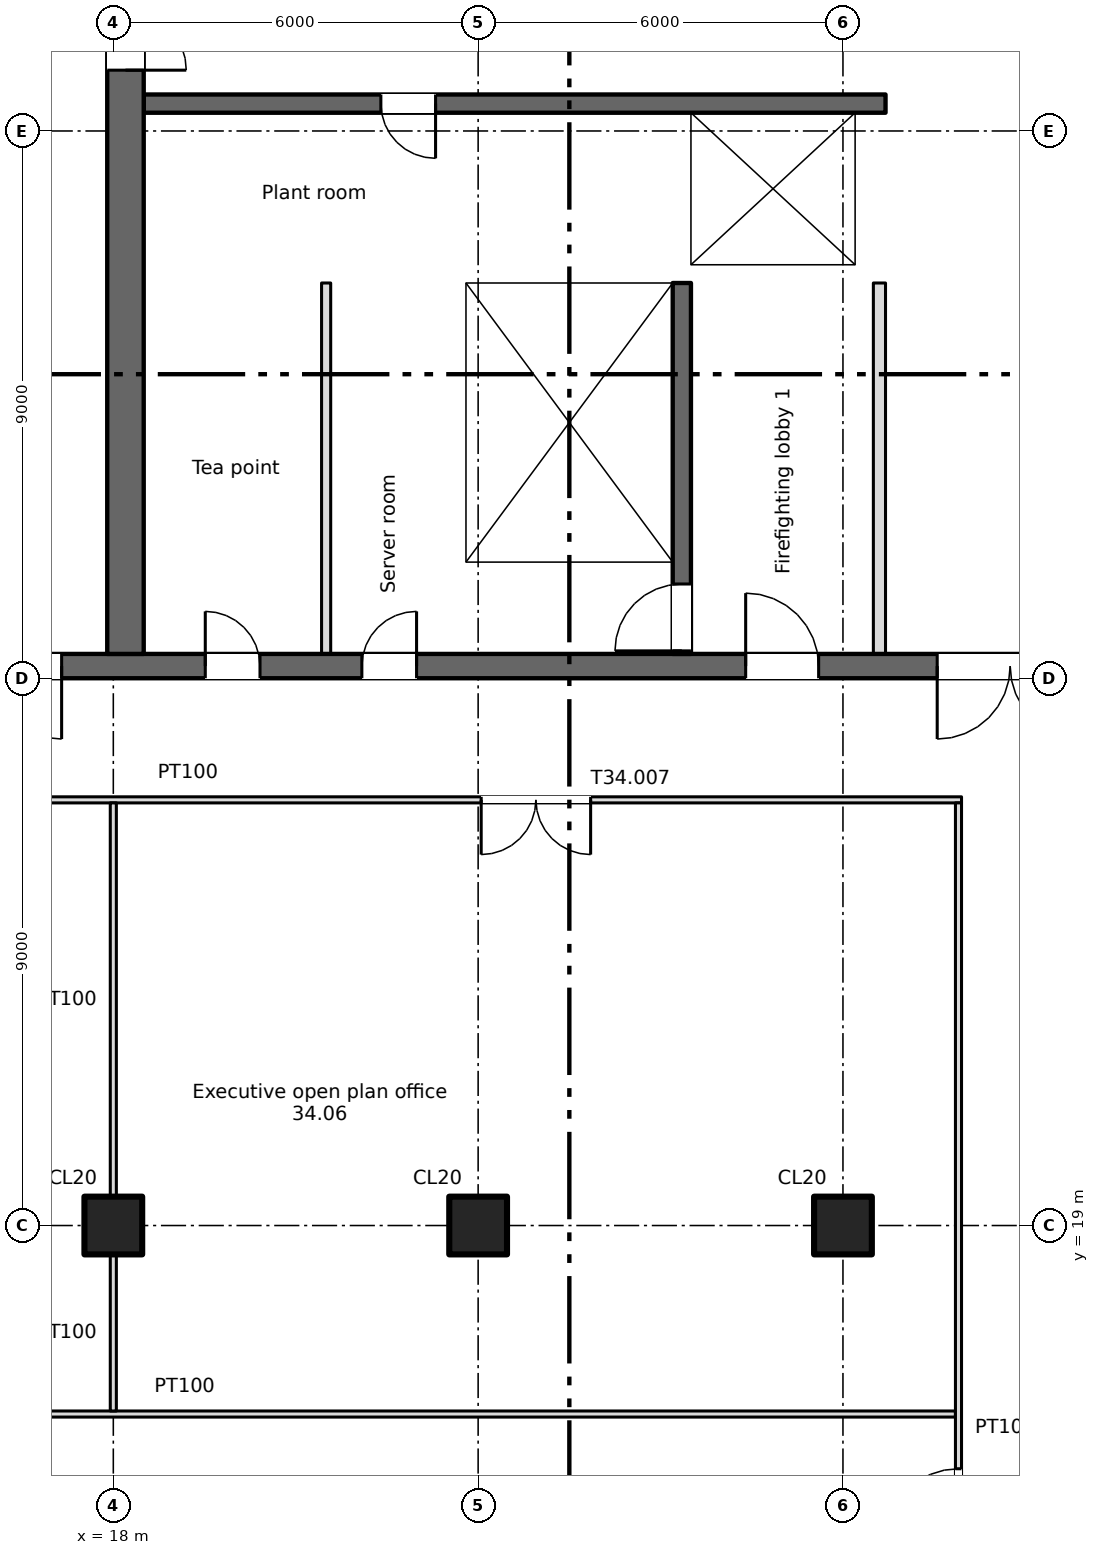
"""IFC4 building model, lengths in metres.
Left out: names, types, materials, properties, quantities, classifications, styles, units other than length and angle.
Written with IfcOpenShell. Run it as: python <this file> out.ifc"""

import sys

from ifc_helpers import new_model, si_unit, direction, frame, frame_2d, origin, origin_2d, place, context, subcontext, project, spatial, rectangle, extrude, element, fill, save


model = new_model("IFC4")
c1 = context("Model", 3, precision=1e-05, world=origin(), true_north=direction((0.0, 1.0)))
c2 = subcontext(c1, "Body", "Model", "MODEL_VIEW")
j1 = project(units=[si_unit("LENGTHUNIT", "METRE"), si_unit("PLANEANGLEUNIT", "RADIAN")], contexts=[c1])
p1 = place(None, origin())
s1 = spatial("IfcSite", under=j1, at=p1, CompositionType="ELEMENT")
p2 = place(p1, origin())
s2 = spatial("IfcBuilding", under=s1, at=p2, CompositionType="ELEMENT")
p3 = place(p2, frame((0.0, 0.0, 235.55)))
s3 = spatial("IfcBuildingStorey", under=s2, at=p3, CompositionType="ELEMENT", Elevation=235.55)
for number, where, z_axis, x_axis in (
    (1, (18.0, 19.0, 0.0), (0.0, 0.0, 1.0), (1.0, 0.0, 0.0)),
    (2, (24.0, 19.0, 0.0), (0.0, 0.0, 1.0), (1.0, 0.0, 0.0)),
    (3, (30.0, 19.0, 0.0), (0.0, 0.0, 1.0), (1.0, 0.0, 0.0)),
):
    element("IfcColumn", number, at=place(p3, frame(where, z_axis=z_axis, x_axis=x_axis)), inside=s3, PredefinedType="COLUMN", context=c2, shape_type="SweptSolid", body=[
        extrude(rectangle(XDim=0.95, YDim=0.95, at=origin_2d()), origin(), (0.0, 0.0, 1.0), 3.4),
    ])
p4 = place(p3, frame((6.5, 28.2, 0.0), z_axis=(0.0, 0.0, 1.0), x_axis=(1.0, 0.0, 0.0)))
e4 = element("IfcWall", 4, at=p4, inside=s3, PredefinedType="SHEAR", context=c2, shape_type="SweptSolid", body=[
    extrude(rectangle(XDim=58.0, YDim=0.4, at=frame_2d((29.0, 0.0))), origin(), (0.0, 0.0, 1.0), 3.4),
])
p5 = place(p4, frame((13.012, 0.0, 0.0)))
e5 = element("IfcOpeningElement", 5, at=p5, cuts=e4, PredefinedType="OPENING", context=c2, shape_type="SweptSolid", body=[
    extrude(rectangle(XDim=0.9, YDim=2.1, at=frame_2d((0.45, 1.05))), frame((0.0, 0.21, 0.0), z_axis=(0.0, -1.0, 0.0), x_axis=(1.0, 0.0, 0.0)), (0.0, 0.0, 1.0), 0.42),
])
p6 = place(p4, frame((15.587, 0.0, 0.0)))
e6 = element("IfcOpeningElement", 6, at=p6, cuts=e4, PredefinedType="OPENING", context=c2, shape_type="SweptSolid", body=[
    extrude(rectangle(XDim=0.9, YDim=2.1, at=frame_2d((0.45, 1.05))), frame((0.0, 0.21, 0.0), z_axis=(0.0, -1.0, 0.0), x_axis=(1.0, 0.0, 0.0)), (0.0, 0.0, 1.0), 0.42),
])
p7 = place(p4, frame((48.512, 0.0, 0.0)))
e7 = element("IfcOpeningElement", 7, at=p7, cuts=e4, PredefinedType="OPENING", context=c2, shape_type="SweptSolid", body=[
    extrude(rectangle(XDim=0.9, YDim=2.1, at=frame_2d((0.45, 1.05))), frame((0.0, 0.21, 0.0), z_axis=(0.0, -1.0, 0.0), x_axis=(1.0, 0.0, 0.0)), (0.0, 0.0, 1.0), 0.42),
])
p8 = place(p4, frame((51.087, 0.0, 0.0)))
e8 = element("IfcOpeningElement", 8, at=p8, cuts=e4, PredefinedType="OPENING", context=c2, shape_type="SweptSolid", body=[
    extrude(rectangle(XDim=0.9, YDim=2.1, at=frame_2d((0.45, 1.05))), frame((0.0, 0.21, 0.0), z_axis=(0.0, -1.0, 0.0), x_axis=(1.0, 0.0, 0.0)), (0.0, 0.0, 1.0), 0.42),
])
p9 = place(p4, frame((0.762, 0.0, 0.0)))
e9 = element("IfcOpeningElement", 9, at=p9, cuts=e4, PredefinedType="OPENING", context=c2, shape_type="SweptSolid", body=[
    extrude(rectangle(XDim=0.9, YDim=2.1, at=frame_2d((0.45, 1.05))), frame((0.0, 0.21, 0.0), z_axis=(0.0, -1.0, 0.0), x_axis=(1.0, 0.0, 0.0)), (0.0, 0.0, 1.0), 0.42),
])
p10 = place(p4, frame((2.337, 0.0, 0.0)))
e10 = element("IfcOpeningElement", 10, at=p10, cuts=e4, PredefinedType="OPENING", context=c2, shape_type="SweptSolid", body=[
    extrude(rectangle(XDim=0.9, YDim=2.1, at=frame_2d((0.45, 1.05))), frame((0.0, 0.21, 0.0), z_axis=(0.0, -1.0, 0.0), x_axis=(1.0, 0.0, 0.0)), (0.0, 0.0, 1.0), 0.42),
])
p11 = place(p4, frame((4.9, 0.0, 0.0)))
e11 = element("IfcOpeningElement", 11, at=p11, cuts=e4, PredefinedType="OPENING", context=c2, shape_type="SweptSolid", body=[
    extrude(rectangle(XDim=1.2, YDim=2.1, at=frame_2d((0.6, 1.05))), frame((0.0, 0.21, 0.0), z_axis=(0.0, -1.0, 0.0), x_axis=(1.0, 0.0, 0.0)), (0.0, 0.0, 1.0), 0.42),
])
p12 = place(p4, frame((31.9, 0.0, 0.0)))
e12 = element("IfcOpeningElement", 12, at=p12, cuts=e4, PredefinedType="OPENING", context=c2, shape_type="SweptSolid", body=[
    extrude(rectangle(XDim=1.2, YDim=2.1, at=frame_2d((0.6, 1.05))), frame((0.0, 0.21, 0.0), z_axis=(0.0, -1.0, 0.0), x_axis=(1.0, 0.0, 0.0)), (0.0, 0.0, 1.0), 0.42),
])
p13 = place(p4, frame((55.4, 0.0, 0.0)))
e13 = element("IfcOpeningElement", 13, at=p13, cuts=e4, PredefinedType="OPENING", context=c2, shape_type="SweptSolid", body=[
    extrude(rectangle(XDim=1.2, YDim=2.1, at=frame_2d((0.6, 1.05))), frame((0.0, 0.21, 0.0), z_axis=(0.0, -1.0, 0.0), x_axis=(1.0, 0.0, 0.0)), (0.0, 0.0, 1.0), 0.42),
])
p14 = place(p4, frame((21.9, 0.0, 0.0)))
e14 = element("IfcOpeningElement", 14, at=p14, cuts=e4, PredefinedType="OPENING", context=c2, shape_type="SweptSolid", body=[
    extrude(rectangle(XDim=1.2, YDim=2.1, at=frame_2d((0.6, 1.05))), frame((0.0, 0.21, 0.0), z_axis=(0.0, -1.0, 0.0), x_axis=(1.0, 0.0, 0.0)), (0.0, 0.0, 1.0), 0.42),
])
p15 = place(p4, frame((41.9, 0.0, 0.0)))
e15 = element("IfcOpeningElement", 15, at=p15, cuts=e4, PredefinedType="OPENING", context=c2, shape_type="SweptSolid", body=[
    extrude(rectangle(XDim=1.2, YDim=2.1, at=frame_2d((0.6, 1.05))), frame((0.0, 0.21, 0.0), z_axis=(0.0, -1.0, 0.0), x_axis=(1.0, 0.0, 0.0)), (0.0, 0.0, 1.0), 0.42),
])
p16 = place(p4, frame((25.05, 0.0, 0.0)))
e16 = element("IfcOpeningElement", 16, at=p16, cuts=e4, PredefinedType="OPENING", context=c2, shape_type="SweptSolid", body=[
    extrude(rectangle(XDim=2.4, YDim=2.1, at=frame_2d((1.2, 1.05))), frame((0.0, 0.21, 0.0), z_axis=(0.0, -1.0, 0.0), x_axis=(1.0, 0.0, 0.0)), (0.0, 0.0, 1.0), 0.42),
])
p17 = place(p4, frame((37.55, 0.0, 0.0)))
e17 = element("IfcOpeningElement", 17, at=p17, cuts=e4, PredefinedType="OPENING", context=c2, shape_type="SweptSolid", body=[
    extrude(rectangle(XDim=2.4, YDim=2.1, at=frame_2d((1.2, 1.05))), frame((0.0, 0.21, 0.0), z_axis=(0.0, -1.0, 0.0), x_axis=(1.0, 0.0, 0.0)), (0.0, 0.0, 1.0), 0.42),
])
p18 = place(p4, frame((8.25, 0.0, 0.0)))
e18 = element("IfcOpeningElement", 18, at=p18, cuts=e4, PredefinedType="OPENING", context=c2, shape_type="SweptSolid", body=[
    extrude(rectangle(XDim=2.4, YDim=2.1, at=frame_2d((1.2, 1.05))), frame((0.0, 0.21, 0.0), z_axis=(0.0, -1.0, 0.0), x_axis=(1.0, 0.0, 0.0)), (0.0, 0.0, 1.0), 0.42),
])
p19 = place(p4, frame((29.05, 0.0, 0.0)))
e19 = element("IfcOpeningElement", 19, at=p19, cuts=e4, PredefinedType="OPENING", context=c2, shape_type="SweptSolid", body=[
    extrude(rectangle(XDim=0.9, YDim=2.1, at=frame_2d((0.45, 1.05))), frame((0.0, 0.21, 0.0), z_axis=(0.0, -1.0, 0.0), x_axis=(1.0, 0.0, 0.0)), (0.0, 0.0, 1.0), 0.42),
])
p20 = place(p4, frame((35.05, 0.0, 0.0)))
e20 = element("IfcOpeningElement", 20, at=p20, cuts=e4, PredefinedType="OPENING", context=c2, shape_type="SweptSolid", body=[
    extrude(rectangle(XDim=0.9, YDim=2.1, at=frame_2d((0.45, 1.05))), frame((0.0, 0.21, 0.0), z_axis=(0.0, -1.0, 0.0), x_axis=(1.0, 0.0, 0.0)), (0.0, 0.0, 1.0), 0.42),
])
p21 = place(p3, frame((18.2, 28.4, 0.0), z_axis=(0.0, 0.0, 1.0), x_axis=(0.0, 1.0, 0.0)))
e21 = element("IfcWall", 21, at=p21, inside=s3, PredefinedType="SHEAR", context=c2, shape_type="SweptSolid", body=[
    extrude(rectangle(XDim=17.0, YDim=0.6, at=frame_2d((8.5, 0.0))), origin(), (0.0, 0.0, 1.0), 3.4),
])
p22 = place(p21, frame((9.6, 0.0, 0.0)))
e22 = element("IfcOpeningElement", 22, at=p22, cuts=e21, PredefinedType="OPENING", context=c2, shape_type="SweptSolid", body=[
    extrude(rectangle(XDim=2.0, YDim=2.1, at=frame_2d((1.0, 1.05))), frame((0.0, 0.31, 0.0), z_axis=(0.0, -1.0, 0.0), x_axis=(1.0, 0.0, 0.0)), (0.0, 0.0, 1.0), 0.62),
])
p23 = place(p21, frame((15.45, 0.0, 0.0)))
e23 = element("IfcOpeningElement", 23, at=p23, cuts=e21, PredefinedType="OPENING", context=c2, shape_type="SweptSolid", body=[
    extrude(rectangle(XDim=1.2, YDim=2.1, at=frame_2d((0.6, 1.05))), frame((0.0, 0.31, 0.0), z_axis=(0.0, -1.0, 0.0), x_axis=(1.0, 0.0, 0.0)), (0.0, 0.0, 1.0), 0.62),
])
p24 = place(p3, frame((23.65, 28.4, 0.0), z_axis=(0.0, 0.0, 1.0), x_axis=(0.0, 1.0, 0.0)))
e24 = element("IfcWall", 24, at=p24, inside=s3, PredefinedType="SHEAR", context=c2, shape_type="SweptSolid", body=[
    extrude(rectangle(XDim=6.1, YDim=0.3, at=frame_2d((3.05, 0.0))), origin(), (0.0, 0.0, 1.0), 3.4),
])
p25 = place(p3, frame((27.35, 28.4, 0.0), z_axis=(0.0, 0.0, 1.0), x_axis=(0.0, 1.0, 0.0)))
e25 = element("IfcWall", 25, at=p25, inside=s3, PredefinedType="SHEAR", context=c2, shape_type="SweptSolid", body=[
    extrude(rectangle(XDim=6.1, YDim=0.3, at=frame_2d((3.05, 0.0))), origin(), (0.0, 0.0, 1.0), 3.4),
])
p26 = place(p25, frame((0.05, 0.0, 0.0)))
e26 = element("IfcOpeningElement", 26, at=p26, cuts=e25, PredefinedType="OPENING", context=c2, shape_type="SweptSolid", body=[
    extrude(rectangle(XDim=1.1, YDim=2.1, at=frame_2d((0.55, 1.05))), frame((0.0, 0.16, 0.0), z_axis=(0.0, -1.0, 0.0), x_axis=(1.0, 0.0, 0.0)), (0.0, 0.0, 1.0), 0.32),
])
p27 = place(p3, frame((18.5, 34.65, 0.0), z_axis=(0.0, 0.0, 1.0), x_axis=(1.0, 0.0, 0.0)))
e27 = element("IfcWall", 27, at=p27, inside=s3, PredefinedType="SHEAR", context=c2, shape_type="SweptSolid", body=[
    extrude(rectangle(XDim=12.2, YDim=0.3, at=frame_2d((6.1, 0.0))), origin(), (0.0, 0.0, 1.0), 3.4),
])
p28 = place(p27, frame((9.8, 0.0, 0.0)))
e28 = element("IfcOpeningElement", 28, at=p28, cuts=e27, PredefinedType="OPENING", context=c2, shape_type="SweptSolid", body=[
    extrude(rectangle(XDim=1.1, YDim=2.1, at=frame_2d((0.55, 1.05))), frame((0.0, 0.16, 0.0), z_axis=(0.0, -1.0, 0.0), x_axis=(1.0, 0.0, 0.0)), (0.0, 0.0, 1.0), 0.32),
])
p29 = place(p3, frame((30.7, 37.45, 0.0), z_axis=(0.0, 0.0, 1.0), x_axis=(-1.0, 0.0, 0.0)))
e29 = element("IfcWall", 29, at=p29, inside=s3, PredefinedType="SHEAR", context=c2, shape_type="SweptSolid", body=[
    extrude(rectangle(XDim=12.2, YDim=0.3, at=frame_2d((6.1, 0.0))), origin(), (0.0, 0.0, 1.0), 3.4),
])
p30 = place(p29, frame((7.4, 0.0, 0.0)))
e30 = element("IfcOpeningElement", 30, at=p30, cuts=e29, PredefinedType="OPENING", context=c2, shape_type="SweptSolid", body=[
    extrude(rectangle(XDim=0.9, YDim=2.1, at=frame_2d((0.45, 1.05))), frame((0.0, 0.16, 0.0), z_axis=(0.0, -1.0, 0.0), x_axis=(1.0, 0.0, 0.0)), (0.0, 0.0, 1.0), 0.32),
])
p31 = place(p3, frame((27.35, 34.8, 0.0), z_axis=(0.0, 0.0, 1.0), x_axis=(0.0, 1.0, 0.0)))
e31 = element("IfcWall", 31, at=p31, inside=s3, PredefinedType="SHEAR", context=c2, shape_type="SweptSolid", body=[
    extrude(rectangle(XDim=2.5, YDim=0.3, at=frame_2d((1.25, 0.0))), origin(), (0.0, 0.0, 1.0), 3.4),
])
p32 = place(p3, frame((30.45, 34.8, 0.0), z_axis=(0.0, 0.0, 1.0), x_axis=(0.0, 1.0, 0.0)))
e32 = element("IfcWall", 32, at=p32, inside=s3, PredefinedType="SHEAR", context=c2, shape_type="SweptSolid", body=[
    extrude(rectangle(XDim=2.5, YDim=0.5, at=frame_2d((1.25, 0.0))), origin(), (0.0, 0.0, 1.0), 3.4),
])
p33 = place(p3, frame((30.6, 28.4, 0.0), z_axis=(0.0, 0.0, 1.0), x_axis=(0.0, 1.0, 0.0)))
e33 = element("IfcWall", 33, at=p33, inside=s3, PredefinedType="PARTITIONING", context=c2, shape_type="SweptSolid", body=[
    extrude(rectangle(XDim=6.1, YDim=0.2, at=frame_2d((3.05, 0.0))), origin(), (0.0, 0.0, 1.0), 3.4),
])
p34 = place(p3, frame((21.5, 28.4, 0.0), z_axis=(0.0, 0.0, 1.0), x_axis=(0.0, 1.0, 0.0)))
e34 = element("IfcWall", 34, at=p34, inside=s3, PredefinedType="PARTITIONING", context=c2, shape_type="SweptSolid", body=[
    extrude(rectangle(XDim=6.1, YDim=0.15, at=frame_2d((3.05, 0.0))), origin(), (0.0, 0.0, 1.0), 3.4),
])
p35 = place(p3, frame((6.5, 15.9, 0.0), z_axis=(0.0, 0.0, 1.0), x_axis=(1.0, 0.0, 0.0)))
e35 = element("IfcWall", 35, at=p35, inside=s3, PredefinedType="PARTITIONING", context=c2, shape_type="SweptSolid", body=[
    extrude(rectangle(XDim=25.35, YDim=0.1, at=frame_2d((12.675, 0.0))), origin(), (0.0, 0.0, 1.0), 3.4),
])
p36 = place(p3, frame((6.5, 26.0, 0.0), z_axis=(0.0, 0.0, 1.0), x_axis=(1.0, 0.0, 0.0)))
e36 = element("IfcWall", 36, at=p36, inside=s3, PredefinedType="PARTITIONING", context=c2, shape_type="SweptSolid", body=[
    extrude(rectangle(XDim=25.45, YDim=0.1, at=frame_2d((12.725, 0.0))), origin(), (0.0, 0.0, 1.0), 3.4),
])
p37 = place(p36, frame((17.55, 0.0, 0.0)))
e37 = element("IfcOpeningElement", 37, at=p37, cuts=e36, PredefinedType="OPENING", context=c2, shape_type="SweptSolid", body=[
    extrude(rectangle(XDim=1.8, YDim=2.1, at=frame_2d((0.9, 1.05))), frame((0.0, 0.06, 0.0), z_axis=(0.0, -1.0, 0.0), x_axis=(1.0, 0.0, 0.0)), (0.0, 0.0, 1.0), 0.12),
])
p38 = place(p36, frame((4.85, 0.0, 0.0)))
e38 = element("IfcOpeningElement", 38, at=p38, cuts=e36, PredefinedType="OPENING", context=c2, shape_type="SweptSolid", body=[
    extrude(rectangle(XDim=1.8, YDim=2.1, at=frame_2d((0.9, 1.05))), frame((0.0, 0.06, 0.0), z_axis=(0.0, -1.0, 0.0), x_axis=(1.0, 0.0, 0.0)), (0.0, 0.0, 1.0), 0.12),
])
p39 = place(p3, frame((18.0, 15.95, 0.0), z_axis=(0.0, 0.0, 1.0), x_axis=(0.0, 1.0, 0.0)))
e39 = element("IfcWall", 39, at=p39, inside=s3, PredefinedType="PARTITIONING", context=c2, shape_type="SweptSolid", body=[
    extrude(rectangle(XDim=2.575, YDim=0.1, at=frame_2d((1.288, 0.0))), origin(), (0.0, 0.0, 1.0), 3.4),
])
p40 = place(p3, frame((18.0, 19.475, 0.0), z_axis=(0.0, 0.0, 1.0), x_axis=(0.0, 1.0, 0.0)))
e40 = element("IfcWall", 40, at=p40, inside=s3, PredefinedType="PARTITIONING", context=c2, shape_type="SweptSolid", body=[
    extrude(rectangle(XDim=6.475, YDim=0.1, at=frame_2d((3.237, 0.0))), origin(), (0.0, 0.0, 1.0), 3.4),
])
p41 = place(p3, frame((31.9, 5.4, 0.0), z_axis=(0.0, 0.0, 1.0), x_axis=(0.0, 1.0, 0.0)))
e41 = element("IfcWall", 41, at=p41, inside=s3, PredefinedType="PARTITIONING", context=c2, shape_type="SweptSolid", body=[
    extrude(rectangle(XDim=20.55, YDim=0.1, at=frame_2d((10.275, 0.0))), origin(), (0.0, 0.0, 1.0), 3.4),
])
p42 = place(p41, frame((1.35, 0.0, 0.0)))
e42 = element("IfcOpeningElement", 42, at=p42, cuts=e41, PredefinedType="OPENING", context=c2, shape_type="SweptSolid", body=[
    extrude(rectangle(XDim=1.8, YDim=2.1, at=frame_2d((0.9, 1.05))), frame((0.0, 0.06, 0.0), z_axis=(0.0, -1.0, 0.0), x_axis=(1.0, 0.0, 0.0)), (0.0, 0.0, 1.0), 0.12),
])
p43 = place(p41, frame((5.4, 0.0, 0.0)))
e43 = element("IfcOpeningElement", 43, at=p43, cuts=e41, PredefinedType="OPENING", context=c2, shape_type="SweptSolid", body=[
    extrude(rectangle(XDim=1.2, YDim=2.1, at=frame_2d((0.6, 1.05))), frame((0.0, 0.06, 0.0), z_axis=(0.0, -1.0, 0.0), x_axis=(1.0, 0.0, 0.0)), (0.0, 0.0, 1.0), 0.12),
])
p44 = place(p41, frame((8.4, 0.0, 0.0)))
e44 = element("IfcOpeningElement", 44, at=p44, cuts=e41, PredefinedType="OPENING", context=c2, shape_type="SweptSolid", body=[
    extrude(rectangle(XDim=1.2, YDim=2.1, at=frame_2d((0.6, 1.05))), frame((0.0, 0.06, 0.0), z_axis=(0.0, -1.0, 0.0), x_axis=(1.0, 0.0, 0.0)), (0.0, 0.0, 1.0), 0.12),
])
p45 = place(p5, origin())
e45 = element("IfcDoor", 45, at=p45, inside=s3, OperationType="SINGLE_SWING_LEFT", PredefinedType="DOOR", context=c2, shape_type="SweptSolid", body=[
    extrude(rectangle(XDim=0.9, YDim=2.1, at=frame_2d((0.45, 1.05))), frame((0.0, 0.025, 0.0), z_axis=(0.0, -1.0, 0.0), x_axis=(1.0, 0.0, 0.0)), (0.0, 0.0, 1.0), 0.05),
])
fill(e5, e45)
p46 = place(p6, origin())
e46 = element("IfcDoor", 46, at=p46, inside=s3, OperationType="SINGLE_SWING_RIGHT", PredefinedType="DOOR", context=c2, shape_type="SweptSolid", body=[
    extrude(rectangle(XDim=0.9, YDim=2.1, at=frame_2d((0.45, 1.05))), frame((0.0, 0.025, 0.0), z_axis=(0.0, -1.0, 0.0), x_axis=(1.0, 0.0, 0.0)), (0.0, 0.0, 1.0), 0.05),
])
fill(e6, e46)
p47 = place(p30, origin())
e47 = element("IfcDoor", 47, at=p47, inside=s3, OperationType="SINGLE_SWING_LEFT", PredefinedType="DOOR", context=c2, shape_type="SweptSolid", body=[
    extrude(rectangle(XDim=0.9, YDim=2.1, at=frame_2d((0.45, 1.05))), frame((0.0, 0.025, 0.0), z_axis=(0.0, -1.0, 0.0), x_axis=(1.0, 0.0, 0.0)), (0.0, 0.0, 1.0), 0.05),
])
fill(e30, e47)
p48 = place(p28, origin())
e48 = element("IfcDoor", 48, at=p48, inside=s3, OperationType="SLIDING_TO_LEFT", PredefinedType="DOOR", context=c2, shape_type="SweptSolid", body=[
    extrude(rectangle(XDim=1.1, YDim=2.1, at=frame_2d((0.55, 1.05))), frame((0.0, 0.025, 0.0), z_axis=(0.0, -1.0, 0.0), x_axis=(1.0, 0.0, 0.0)), (0.0, 0.0, 1.0), 0.05),
])
fill(e28, e48)
p49 = place(p26, origin())
e49 = element("IfcDoor", 49, at=p49, inside=s3, OperationType="SINGLE_SWING_LEFT", PredefinedType="DOOR", context=c2, shape_type="SweptSolid", body=[
    extrude(rectangle(XDim=1.1, YDim=2.1, at=frame_2d((0.55, 1.05))), frame((0.0, 0.025, 0.0), z_axis=(0.0, -1.0, 0.0), x_axis=(1.0, 0.0, 0.0)), (0.0, 0.0, 1.0), 0.05),
])
fill(e26, e49)
p50 = place(p14, origin())
e50 = element("IfcDoor", 50, at=p50, inside=s3, OperationType="SINGLE_SWING_LEFT", PredefinedType="DOOR", context=c2, shape_type="SweptSolid", body=[
    extrude(rectangle(XDim=1.2, YDim=2.1, at=frame_2d((0.6, 1.05))), frame((0.0, 0.025, 0.0), z_axis=(0.0, -1.0, 0.0), x_axis=(1.0, 0.0, 0.0)), (0.0, 0.0, 1.0), 0.05),
])
fill(e14, e50)
p51 = place(p16, origin())
e51 = element("IfcDoor", 51, at=p51, inside=s3, OperationType="DOUBLE_DOOR_SINGLE_SWING", PredefinedType="DOOR", context=c2, shape_type="SweptSolid", body=[
    extrude(rectangle(XDim=2.4, YDim=2.1, at=frame_2d((1.2, 1.05))), frame((0.0, 0.025, 0.0), z_axis=(0.0, -1.0, 0.0), x_axis=(1.0, 0.0, 0.0)), (0.0, 0.0, 1.0), 0.05),
])
fill(e16, e51)
p52 = place(p18, origin())
e52 = element("IfcDoor", 52, at=p52, inside=s3, OperationType="DOUBLE_DOOR_SINGLE_SWING", PredefinedType="DOOR", context=c2, shape_type="SweptSolid", body=[
    extrude(rectangle(XDim=2.4, YDim=2.1, at=frame_2d((1.2, 1.05))), frame((0.0, 0.025, 0.0), z_axis=(0.0, -1.0, 0.0), x_axis=(1.0, 0.0, 0.0)), (0.0, 0.0, 1.0), 0.05),
])
fill(e18, e52)
p53 = place(p22, origin())
e53 = element("IfcDoor", 53, at=p53, inside=s3, OperationType="DOUBLE_DOOR_SINGLE_SWING", PredefinedType="DOOR", context=c2, shape_type="SweptSolid", body=[
    extrude(rectangle(XDim=2.0, YDim=2.1, at=frame_2d((1.0, 1.05))), frame((0.0, 0.025, 0.0), z_axis=(0.0, -1.0, 0.0), x_axis=(1.0, 0.0, 0.0)), (0.0, 0.0, 1.0), 0.05),
])
fill(e22, e53)
p54 = place(p44, origin())
e54 = element("IfcDoor", 54, at=p54, inside=s3, OperationType="SINGLE_SWING_LEFT", PredefinedType="DOOR", context=c2, shape_type="SweptSolid", body=[
    extrude(rectangle(XDim=1.2, YDim=2.1, at=frame_2d((0.6, 1.05))), frame((0.0, 0.025, 0.0), z_axis=(0.0, -1.0, 0.0), x_axis=(1.0, 0.0, 0.0)), (0.0, 0.0, 1.0), 0.05),
])
fill(e44, e54)
p55 = place(p37, origin())
e55 = element("IfcDoor", 55, at=p55, inside=s3, OperationType="DOUBLE_DOOR_SINGLE_SWING", PredefinedType="DOOR", context=c2, shape_type="SweptSolid", body=[
    extrude(rectangle(XDim=1.8, YDim=2.1, at=frame_2d((0.9, 1.05))), frame((0.0, 0.025, 0.0), z_axis=(0.0, -1.0, 0.0), x_axis=(1.0, 0.0, 0.0)), (0.0, 0.0, 1.0), 0.05),
])
fill(e37, e55)
save(model, sys.argv[1])
